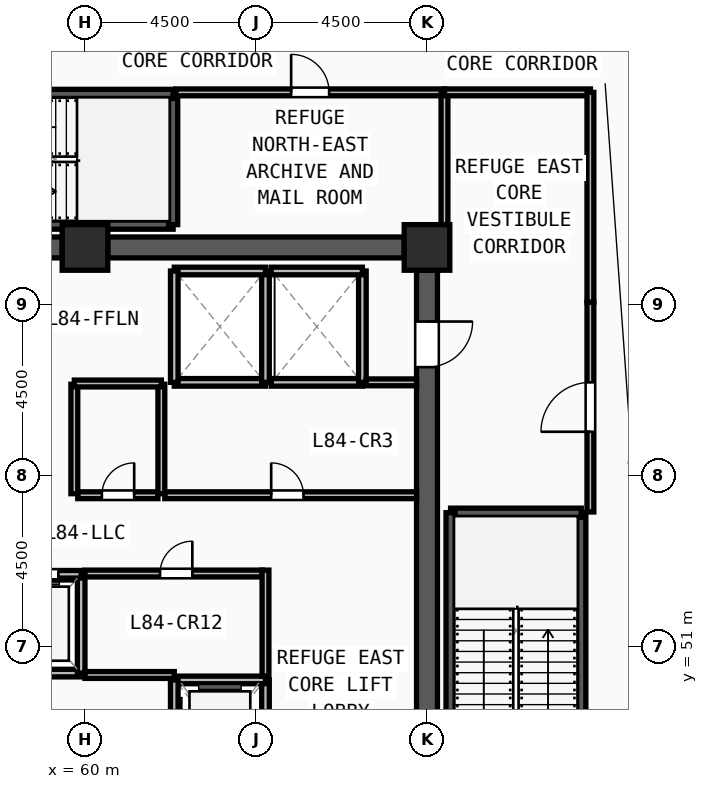
"""IFC4 building model, lengths in metres.
Left out: names, types, materials, properties, quantities, classifications, styles, units other than length and angle.
Written with IfcOpenShell. Run it as: python <this file> out.ifc"""

import sys

from ifc_helpers import new_model, si_unit, direction, frame, frame_2d, origin, origin_2d, place, context, subcontext, project, spatial, rectangle, extrude, source, transform, mapped, element, fill, save


model = new_model("IFC4")
c1 = context("Model", 3, precision=1e-05, world=origin(), true_north=direction((0.0, 1.0)))
c2 = subcontext(c1, "Body", "Model", "MODEL_VIEW")
j1 = project(units=[si_unit("LENGTHUNIT", "METRE"), si_unit("PLANEANGLEUNIT", "RADIAN")], contexts=[c1])
p1 = place(None, origin())
s1 = spatial("IfcSite", under=j1, at=p1, CompositionType="ELEMENT")
p2 = place(p1, origin())
s2 = spatial("IfcBuilding", under=s1, at=p2, CompositionType="ELEMENT")
p3 = place(p2, frame((0.0, 0.0, 324.0)))
s3 = spatial("IfcBuildingStorey", under=s2, at=p3, CompositionType="ELEMENT", Elevation=324.0)
m1 = source(origin(), c2, "Body", "SweptSolid", [
    extrude(rectangle(XDim=1.2, YDim=1.2, at=origin_2d()), origin(), (0.0, 0.0, 1.0), 4.5),
])
for number, where, z_axis, x_axis in (
    (1, (69.0, 61.5, 0.0), (0.0, 0.0, 1.0), (1.0, 0.0, 0.0)),
    (2, (60.0, 61.5, 0.0), (0.0, 0.0, 1.0), (1.0, 0.0, 0.0)),
):
    element("IfcColumn", number, at=place(p3, frame(where, z_axis=z_axis, x_axis=x_axis)), inside=s3, PredefinedType="COLUMN", context=c2, shape_type="MappedRepresentation", body=[
        mapped(m1, transform((0.0, 0.0, 0.0), x_axis=(1.0, 0.0, 0.0), y_axis=(0.0, 1.0, 0.0), z_axis=(0.0, 0.0, 1.0), scale=1.0)),
    ])
for number, where, z_axis, x_axis in (
    (3, (51.6, 61.5, 0.0), (0.0, 0.0, 1.0), (1.0, 0.0, 0.0)),
    (4, (60.6, 61.5, 0.0), (0.0, 0.0, 1.0), (1.0, 0.0, 0.0)),
):
    element("IfcWall", number, at=place(p3, frame(where, z_axis=z_axis, x_axis=x_axis)), inside=s3, PredefinedType="SHEAR", context=c2, shape_type="SweptSolid", body=[
        extrude(rectangle(XDim=7.8, YDim=0.55, at=frame_2d((3.9, 0.0))), origin(), (0.0, 0.0, 1.0), 4.32),
    ])
p4 = place(p3, frame((69.0, 60.9, 0.0), z_axis=(0.0, 0.0, 1.0), x_axis=(0.0, -1.0, 0.0)))
e5 = element("IfcWall", 5, at=p4, inside=s3, PredefinedType="SHEAR", context=c2, shape_type="SweptSolid", body=[
    extrude(rectangle(XDim=13.8, YDim=0.55, at=frame_2d((6.9, 0.0))), origin(), (0.0, 0.0, 1.0), 4.32),
])
m2 = source(origin(), c2, "Body", "SweptSolid", [
    extrude(rectangle(XDim=1.2, YDim=2.2, at=frame_2d((0.6, 1.1))), frame((0.0, 0.285, 0.0), z_axis=(0.0, -1.0, 0.0), x_axis=(1.0, 0.0, 0.0)), (0.0, 0.0, 1.0), 0.57),
])
p5 = place(p4, frame((1.35, 0.0, 0.0)))
e6 = element("IfcOpeningElement", 6, at=p5, cuts=e5, PredefinedType="OPENING", context=c2, shape_type="MappedRepresentation", body=[
    mapped(m2, transform((0.0, 0.0, 0.0), x_axis=(1.0, 0.0, 0.0), y_axis=(0.0, 1.0, 0.0), z_axis=(0.0, 0.0, 1.0), scale=1.0)),
])
p6 = place(p3, frame((73.06, 46.7, 0.0), z_axis=(0.0, 0.0, 1.0), x_axis=(0.0, 1.0, 0.0)))
e7 = element("IfcWall", 7, at=p6, inside=s3, PredefinedType="SOLIDWALL", context=c2, shape_type="SweptSolid", body=[
    extrude(rectangle(XDim=7.82, YDim=0.24, at=frame_2d((3.91, 0.0))), origin(), (0.0, 0.0, 1.0), 4.32),
])
m3 = source(origin(), c2, "Body", "SweptSolid", [
    extrude(rectangle(XDim=1.2, YDim=2.2, at=frame_2d((0.6, 1.1))), frame((0.0, 0.13, 0.0), z_axis=(0.0, -1.0, 0.0), x_axis=(1.0, 0.0, 0.0)), (0.0, 0.0, 1.0), 0.26),
])
p7 = place(p6, frame((0.32, 0.0, 0.0)))
e8 = element("IfcOpeningElement", 8, at=p7, cuts=e7, PredefinedType="OPENING", context=c2, shape_type="MappedRepresentation", body=[
    mapped(m3, transform((0.0, 0.0, 0.0), x_axis=(1.0, 0.0, 0.0), y_axis=(0.0, 1.0, 0.0), z_axis=(0.0, 0.0, 1.0), scale=1.0)),
])
p8 = place(p3, frame((73.06, 54.52, 0.0), z_axis=(0.0, 0.0, 1.0), x_axis=(-1.0, 0.0, 0.0)))
e9 = element("IfcWall", 9, at=p8, inside=s3, PredefinedType="SOLIDWALL", context=c2, shape_type="SweptSolid", body=[
    extrude(rectangle(XDim=3.44, YDim=0.24, at=frame_2d((1.72, 0.0))), origin(), (0.0, 0.0, 1.0), 4.32),
])
for number, where, z_axis, x_axis in (
    (10, (69.62, 54.52, 0.0), (0.0, 0.0, 1.0), (0.0, -1.0, 0.0)),
    (11, (54.5, 62.1, 0.0), (0.0, 0.0, 1.0), (1.0, 0.0, 0.0)),
):
    element("IfcWall", number, at=place(p3, frame(where, z_axis=z_axis, x_axis=x_axis)), inside=s3, PredefinedType="SOLIDWALL", context=c2, shape_type="SweptSolid", body=[
        extrude(rectangle(XDim=7.82, YDim=0.24, at=frame_2d((3.91, 0.0))), origin(), (0.0, 0.0, 1.0), 4.32),
    ])
p9 = place(p3, frame((62.32, 62.1, 0.0), z_axis=(0.0, 0.0, 1.0), x_axis=(0.0, 1.0, 0.0)))
e12 = element("IfcWall", 12, at=p9, inside=s3, PredefinedType="SOLIDWALL", context=c2, shape_type="SweptSolid", body=[
    extrude(rectangle(XDim=3.44, YDim=0.24, at=frame_2d((1.72, 0.0))), origin(), (0.0, 0.0, 1.0), 4.32),
])
p10 = place(p3, frame((62.32, 65.54, 0.0), z_axis=(0.0, 0.0, 1.0), x_axis=(-1.0, 0.0, 0.0)))
e13 = element("IfcWall", 13, at=p10, inside=s3, PredefinedType="SOLIDWALL", context=c2, shape_type="SweptSolid", body=[
    extrude(rectangle(XDim=7.82, YDim=0.24, at=frame_2d((3.91, 0.0))), origin(), (0.0, 0.0, 1.0), 4.32),
])
p11 = place(p10, frame((6.3, 0.0, 0.0)))
e14 = element("IfcOpeningElement", 14, at=p11, cuts=e13, PredefinedType="OPENING", context=c2, shape_type="MappedRepresentation", body=[
    mapped(m3, transform((0.0, 0.0, 0.0), x_axis=(1.0, 0.0, 0.0), y_axis=(0.0, 1.0, 0.0), z_axis=(0.0, 0.0, 1.0), scale=1.0)),
])
p12 = place(p3, frame((64.75, 47.12, 0.0), z_axis=(0.0, 0.0, 1.0), x_axis=(0.0, 1.0, 0.0)))
e15 = element("IfcWall", 15, at=p12, inside=s3, PredefinedType="SOLIDWALL", context=c2, shape_type="SweptSolid", body=[
    extrude(rectangle(XDim=3.0, YDim=0.2, at=frame_2d((1.5, 0.0))), origin(), (0.0, 0.0, 1.0), 4.32),
])
p13 = place(p3, frame((64.75, 50.12, 0.0), z_axis=(0.0, 0.0, 1.0), x_axis=(-1.0, 0.0, 0.0)))
e16 = element("IfcWall", 16, at=p13, inside=s3, PredefinedType="SOLIDWALL", context=c2, shape_type="SweptSolid", body=[
    extrude(rectangle(XDim=2.4, YDim=0.2, at=frame_2d((1.2, 0.0))), origin(), (0.0, 0.0, 1.0), 4.32),
])
p14 = place(p3, frame((62.35, 50.12, 0.0), z_axis=(0.0, 0.0, 1.0), x_axis=(0.0, -1.0, 0.0)))
e17 = element("IfcWall", 17, at=p14, inside=s3, PredefinedType="SOLIDWALL", context=c2, shape_type="SweptSolid", body=[
    extrude(rectangle(XDim=3.0, YDim=0.2, at=frame_2d((1.5, 0.0))), origin(), (0.0, 0.0, 1.0), 4.32),
])
m4 = source(origin(), c2, "Body", "SweptSolid", [
    extrude(rectangle(XDim=1.2, YDim=2.3, at=frame_2d((0.6, 1.15))), frame((0.0, 0.11, 0.0), z_axis=(0.0, -1.0, 0.0), x_axis=(1.0, 0.0, 0.0)), (0.0, 0.0, 1.0), 0.22),
])
p15 = place(p14, frame((0.9, 0.0, 0.0)))
e18 = element("IfcOpeningElement", 18, at=p15, cuts=e17, PredefinedType="OPENING", context=c2, shape_type="MappedRepresentation", body=[
    mapped(m4, transform((0.0, 0.0, 0.0), x_axis=(1.0, 0.0, 0.0), y_axis=(0.0, 1.0, 0.0), z_axis=(0.0, 0.0, 1.0), scale=1.0)),
])
p16 = place(p3, frame((62.35, 57.95, 0.0), z_axis=(0.0, 0.0, 1.0), x_axis=(1.0, 0.0, 0.0)))
e19 = element("IfcWall", 19, at=p16, inside=s3, PredefinedType="SOLIDWALL", context=c2, shape_type="SweptSolid", body=[
    extrude(rectangle(XDim=2.4, YDim=0.2, at=frame_2d((1.2, 0.0))), origin(), (0.0, 0.0, 1.0), 4.32),
])
p17 = place(p3, frame((64.75, 57.95, 0.0), z_axis=(0.0, 0.0, 1.0), x_axis=(0.0, 1.0, 0.0)))
e20 = element("IfcWall", 20, at=p17, inside=s3, PredefinedType="SOLIDWALL", context=c2, shape_type="SweptSolid", body=[
    extrude(rectangle(XDim=2.93, YDim=0.2, at=frame_2d((1.465, 0.0))), origin(), (0.0, 0.0, 1.0), 4.32),
])
p18 = place(p3, frame((64.75, 60.88, 0.0), z_axis=(0.0, 0.0, 1.0), x_axis=(-1.0, 0.0, 0.0)))
e21 = element("IfcWall", 21, at=p18, inside=s3, PredefinedType="SOLIDWALL", context=c2, shape_type="SweptSolid", body=[
    extrude(rectangle(XDim=2.4, YDim=0.2, at=frame_2d((1.2, 0.0))), origin(), (0.0, 0.0, 1.0), 4.32),
])
p19 = place(p3, frame((62.35, 60.88, 0.0), z_axis=(0.0, 0.0, 1.0), x_axis=(0.0, -1.0, 0.0)))
e22 = element("IfcWall", 22, at=p19, inside=s3, PredefinedType="SOLIDWALL", context=c2, shape_type="SweptSolid", body=[
    extrude(rectangle(XDim=2.93, YDim=0.2, at=frame_2d((1.465, 0.0))), origin(), (0.0, 0.0, 1.0), 4.32),
])
p20 = place(p3, frame((64.9, 57.95, 0.0), z_axis=(0.0, 0.0, 1.0), x_axis=(1.0, 0.0, 0.0)))
e23 = element("IfcWall", 23, at=p20, inside=s3, PredefinedType="SOLIDWALL", context=c2, shape_type="SweptSolid", body=[
    extrude(rectangle(XDim=2.4, YDim=0.2, at=frame_2d((1.2, 0.0))), origin(), (0.0, 0.0, 1.0), 4.32),
])
p21 = place(p3, frame((67.3, 57.95, 0.0), z_axis=(0.0, 0.0, 1.0), x_axis=(0.0, 1.0, 0.0)))
e24 = element("IfcWall", 24, at=p21, inside=s3, PredefinedType="SOLIDWALL", context=c2, shape_type="SweptSolid", body=[
    extrude(rectangle(XDim=2.93, YDim=0.2, at=frame_2d((1.465, 0.0))), origin(), (0.0, 0.0, 1.0), 4.32),
])
p22 = place(p3, frame((67.3, 60.88, 0.0), z_axis=(0.0, 0.0, 1.0), x_axis=(-1.0, 0.0, 0.0)))
e25 = element("IfcWall", 25, at=p22, inside=s3, PredefinedType="SOLIDWALL", context=c2, shape_type="SweptSolid", body=[
    extrude(rectangle(XDim=2.4, YDim=0.2, at=frame_2d((1.2, 0.0))), origin(), (0.0, 0.0, 1.0), 4.32),
])
p23 = place(p3, frame((57.6, 50.3, 0.0), z_axis=(0.0, 0.0, 1.0), x_axis=(1.0, 0.0, 0.0)))
e26 = element("IfcWall", 26, at=p23, inside=s3, PredefinedType="SOLIDWALL", context=c2, shape_type="SweptSolid", body=[
    extrude(rectangle(XDim=2.3, YDim=0.2, at=frame_2d((1.15, 0.0))), origin(), (0.0, 0.0, 1.0), 4.32),
])
p24 = place(p3, frame((59.9, 50.3, 0.0), z_axis=(0.0, 0.0, 1.0), x_axis=(0.0, 1.0, 0.0)))
e27 = element("IfcWall", 27, at=p24, inside=s3, PredefinedType="SOLIDWALL", context=c2, shape_type="SweptSolid", body=[
    extrude(rectangle(XDim=2.6, YDim=0.2, at=frame_2d((1.3, 0.0))), origin(), (0.0, 0.0, 1.0), 4.32),
])
p25 = place(p3, frame((59.9, 52.9, 0.0), z_axis=(0.0, 0.0, 1.0), x_axis=(-1.0, 0.0, 0.0)))
e28 = element("IfcWall", 28, at=p25, inside=s3, PredefinedType="SOLIDWALL", context=c2, shape_type="SweptSolid", body=[
    extrude(rectangle(XDim=2.3, YDim=0.2, at=frame_2d((1.15, 0.0))), origin(), (0.0, 0.0, 1.0), 4.32),
])
m5 = source(origin(), c2, "Body", "SweptSolid", [
    extrude(rectangle(XDim=1.1, YDim=2.2, at=frame_2d((0.55, 1.1))), frame((0.0, 0.11, 0.0), z_axis=(0.0, -1.0, 0.0), x_axis=(1.0, 0.0, 0.0)), (0.0, 0.0, 1.0), 0.22),
])
p26 = place(p25, frame((0.6, 0.0, 0.0)))
e29 = element("IfcOpeningElement", 29, at=p26, cuts=e28, PredefinedType="OPENING", context=c2, shape_type="MappedRepresentation", body=[
    mapped(m5, transform((0.0, 0.0, 0.0), x_axis=(1.0, 0.0, 0.0), y_axis=(0.0, 1.0, 0.0), z_axis=(0.0, 0.0, 1.0), scale=1.0)),
])
p27 = place(p3, frame((60.0, 52.92, 0.0), z_axis=(0.0, 0.0, 1.0), x_axis=(1.0, 0.0, 0.0)))
e30 = element("IfcWall", 30, at=p27, inside=s3, PredefinedType="PARTITIONING", context=c2, shape_type="SweptSolid", body=[
    extrude(rectangle(XDim=4.66, YDim=0.18, at=frame_2d((2.33, 0.0))), origin(), (0.0, 0.0, 1.0), 4.32),
])
m6 = source(origin(), c2, "Body", "SweptSolid", [
    extrude(rectangle(XDim=0.85, YDim=2.1, at=frame_2d((0.425, 1.05))), frame((0.0, 0.1, 0.0), z_axis=(0.0, -1.0, 0.0), x_axis=(1.0, 0.0, 0.0)), (0.0, 0.0, 1.0), 0.2),
])
p28 = place(p27, frame((1.975, 0.0, 0.0)))
e31 = element("IfcOpeningElement", 31, at=p28, cuts=e30, PredefinedType="OPENING", context=c2, shape_type="MappedRepresentation", body=[
    mapped(m6, transform((0.0, 0.0, 0.0), x_axis=(1.0, 0.0, 0.0), y_axis=(0.0, 1.0, 0.0), z_axis=(0.0, 0.0, 1.0), scale=1.0)),
])
p29 = place(p3, frame((62.1, 54.98, 0.0), z_axis=(0.0, 0.0, 1.0), x_axis=(1.0, 0.0, 0.0)))
e32 = element("IfcWall", 32, at=p29, inside=s3, PredefinedType="PARTITIONING", context=c2, shape_type="SweptSolid", body=[
    extrude(rectangle(XDim=6.625, YDim=0.18, at=frame_2d((3.312, 0.0))), origin(), (0.0, 0.0, 1.0), 4.32),
])
p30 = place(p29, frame((2.8, 0.0, 0.0)))
e33 = element("IfcOpeningElement", 33, at=p30, cuts=e32, PredefinedType="OPENING", context=c2, shape_type="MappedRepresentation", body=[
    mapped(m6, transform((0.0, 0.0, 0.0), x_axis=(1.0, 0.0, 0.0), y_axis=(0.0, 1.0, 0.0), z_axis=(0.0, 0.0, 1.0), scale=1.0)),
])
p31 = place(p3, frame((59.81, 54.98, 0.0), z_axis=(0.0, 0.0, 1.0), x_axis=(1.0, 0.0, 0.0)))
e34 = element("IfcWall", 34, at=p31, inside=s3, PredefinedType="PARTITIONING", context=c2, shape_type="SweptSolid", body=[
    extrude(rectangle(XDim=2.11, YDim=0.18, at=frame_2d((1.055, 0.0))), origin(), (0.0, 0.0, 1.0), 4.32),
])
p32 = place(p31, frame((0.635, 0.0, 0.0)))
e35 = element("IfcOpeningElement", 35, at=p32, cuts=e34, PredefinedType="OPENING", context=c2, shape_type="MappedRepresentation", body=[
    mapped(m6, transform((0.0, 0.0, 0.0), x_axis=(1.0, 0.0, 0.0), y_axis=(0.0, 1.0, 0.0), z_axis=(0.0, 0.0, 1.0), scale=1.0)),
])
p33 = place(p3, frame((62.39, 65.58, 0.0), z_axis=(0.0, 0.0, 1.0), x_axis=(1.0, 0.0, 0.0)))
e36 = element("IfcWall", 36, at=p33, inside=s3, PredefinedType="PARTITIONING", context=c2, shape_type="SweptSolid", body=[
    extrude(rectangle(XDim=7.07, YDim=0.18, at=frame_2d((3.535, 0.0))), origin(), (0.0, 0.0, 1.0), 4.32),
])
m7 = source(origin(), c2, "Body", "SweptSolid", [
    extrude(rectangle(XDim=1.0, YDim=2.2, at=frame_2d((0.5, 1.1))), frame((0.0, 0.1, 0.0), z_axis=(0.0, -1.0, 0.0), x_axis=(1.0, 0.0, 0.0)), (0.0, 0.0, 1.0), 0.2),
])
p34 = place(p33, frame((3.035, 0.0, 0.0)))
e37 = element("IfcOpeningElement", 37, at=p34, cuts=e36, PredefinedType="OPENING", context=c2, shape_type="MappedRepresentation", body=[
    mapped(m7, transform((0.0, 0.0, 0.0), x_axis=(1.0, 0.0, 0.0), y_axis=(0.0, 1.0, 0.0), z_axis=(0.0, 0.0, 1.0), scale=1.0)),
])
p35 = place(p3, frame((73.3, 54.54, 0.0), z_axis=(0.0, 0.0, 1.0), x_axis=(0.0, 1.0, 0.0)))
e38 = element("IfcWall", 38, at=p35, inside=s3, PredefinedType="PARTITIONING", context=c2, shape_type="SweptSolid", body=[
    extrude(rectangle(XDim=5.52, YDim=0.18, at=frame_2d((2.76, 0.0))), origin(), (0.0, 0.0, 1.0), 4.32),
])
m8 = source(origin(), c2, "Body", "SweptSolid", [
    extrude(rectangle(XDim=1.3, YDim=2.2, at=frame_2d((0.65, 1.1))), frame((0.0, 0.1, 0.0), z_axis=(0.0, -1.0, 0.0), x_axis=(1.0, 0.0, 0.0)), (0.0, 0.0, 1.0), 0.2),
])
p36 = place(p35, frame((2.11, 0.0, 0.0)))
e39 = element("IfcOpeningElement", 39, at=p36, cuts=e38, PredefinedType="OPENING", context=c2, shape_type="MappedRepresentation", body=[
    mapped(m8, transform((0.0, 0.0, 0.0), x_axis=(1.0, 0.0, 0.0), y_axis=(0.0, 1.0, 0.0), z_axis=(0.0, 0.0, 1.0), scale=1.0)),
])
for number, where, z_axis, x_axis in (
    (40, (59.72, 55.02, 0.0), (0.0, 0.0, 1.0), (0.0, 1.0, 0.0)),
    (41, (62.01, 55.02, 0.0), (0.0, 0.0, 1.0), (0.0, 1.0, 0.0)),
):
    element("IfcWall", number, at=place(p3, frame(where, z_axis=z_axis, x_axis=x_axis)), inside=s3, PredefinedType="PARTITIONING", context=c2, shape_type="SweptSolid", body=[
        extrude(rectangle(XDim=2.88, YDim=0.18, at=frame_2d((1.44, 0.0))), origin(), (0.0, 0.0, 1.0), 4.32),
    ])
p37 = place(p3, frame((59.72, 57.92, 0.0), z_axis=(0.0, 0.0, 1.0), x_axis=(1.0, 0.0, 0.0)))
e42 = element("IfcWall", 42, at=p37, inside=s3, PredefinedType="PARTITIONING", context=c2, shape_type="SweptSolid", body=[
    extrude(rectangle(XDim=2.29, YDim=0.18, at=frame_2d((1.145, 0.0))), origin(), (0.0, 0.0, 1.0), 4.32),
])
p38 = place(p3, frame((69.46, 61.95, 0.0), z_axis=(0.0, 0.0, 1.0), x_axis=(0.0, 1.0, 0.0)))
e43 = element("IfcWall", 43, at=p38, inside=s3, PredefinedType="PARTITIONING", context=c2, shape_type="SweptSolid", body=[
    extrude(rectangle(XDim=3.63, YDim=0.18, at=frame_2d((1.815, 0.0))), origin(), (0.0, 0.0, 1.0), 4.32),
])
p39 = place(p3, frame((69.46, 65.58, 0.0), z_axis=(0.0, 0.0, 1.0), x_axis=(1.0, 0.0, 0.0)))
e44 = element("IfcWall", 44, at=p39, inside=s3, PredefinedType="PARTITIONING", context=c2, shape_type="SweptSolid", body=[
    extrude(rectangle(XDim=3.84, YDim=0.18, at=frame_2d((1.92, 0.0))), origin(), (0.0, 0.0, 1.0), 4.32),
])
p40 = place(p3, frame((73.3, 60.06, 0.0), z_axis=(0.0, 0.0, 1.0), x_axis=(0.0, 1.0, 0.0)))
e45 = element("IfcWall", 45, at=p40, inside=s3, PredefinedType="PARTITIONING", context=c2, shape_type="SweptSolid", body=[
    extrude(rectangle(XDim=5.52, YDim=0.18, at=frame_2d((2.76, 0.0))), origin(), (0.0, 0.0, 1.0), 4.32),
])
p41 = place(p3, frame((64.75, 50.22, 0.0), z_axis=(0.0, 0.0, 1.0), x_axis=(0.0, 1.0, 0.0)))
e46 = element("IfcWall", 46, at=p41, inside=s3, PredefinedType="PARTITIONING", context=c2, shape_type="SweptSolid", body=[
    extrude(rectangle(XDim=2.79, YDim=0.18, at=frame_2d((1.395, 0.0))), origin(), (0.0, 0.0, 1.0), 4.32),
])
p42 = place(p3, frame((60.0, 50.25, 0.0), z_axis=(0.0, 0.0, 1.0), x_axis=(1.0, 0.0, 0.0)))
e47 = element("IfcWall", 47, at=p42, inside=s3, PredefinedType="PARTITIONING", context=c2, shape_type="SweptSolid", body=[
    extrude(rectangle(XDim=2.35, YDim=0.18, at=frame_2d((1.175, 0.0))), origin(), (0.0, 0.0, 1.0), 4.32),
])
p43 = place(p3, frame((67.4, 57.95, 0.0), z_axis=(0.0, 0.0, 1.0), x_axis=(1.0, 0.0, 0.0)))
e48 = element("IfcWall", 48, at=p43, inside=s3, PredefinedType="PARTITIONING", context=c2, shape_type="SweptSolid", body=[
    extrude(rectangle(XDim=1.325, YDim=0.18, at=frame_2d((0.663, 0.0))), origin(), (0.0, 0.0, 1.0), 4.32),
])
m9 = source(origin(), c2, "Body", "SweptSolid", [
    extrude(rectangle(XDim=1.2, YDim=2.2, at=frame_2d((0.6, 1.1))), frame((0.0, 0.025, 0.0), z_axis=(0.0, -1.0, 0.0), x_axis=(1.0, 0.0, 0.0)), (0.0, 0.0, 1.0), 0.05),
])
p44 = place(p5, origin())
e49 = element("IfcDoor", 49, at=p44, inside=s3, OperationType="SINGLE_SWING_LEFT", PredefinedType="DOOR", context=c2, shape_type="MappedRepresentation", body=[
    mapped(m9, transform((0.0, 0.0, 0.0), x_axis=(1.0, 0.0, 0.0), y_axis=(0.0, 1.0, 0.0), z_axis=(0.0, 0.0, 1.0), scale=1.0)),
])
fill(e6, e49)
m10 = source(origin(), c2, "Body", "SweptSolid", [
    extrude(rectangle(XDim=1.1, YDim=2.2, at=frame_2d((0.55, 1.1))), frame((0.0, 0.025, 0.0), z_axis=(0.0, -1.0, 0.0), x_axis=(1.0, 0.0, 0.0)), (0.0, 0.0, 1.0), 0.05),
])
p45 = place(p26, origin())
e50 = element("IfcDoor", 50, at=p45, inside=s3, OperationType="SLIDING_TO_LEFT", PredefinedType="DOOR", context=c2, shape_type="MappedRepresentation", body=[
    mapped(m10, transform((0.0, 0.0, 0.0), x_axis=(1.0, 0.0, 0.0), y_axis=(0.0, 1.0, 0.0), z_axis=(0.0, 0.0, 1.0), scale=1.0)),
])
fill(e29, e50)
m11 = source(origin(), c2, "Body", "SweptSolid", [
    extrude(rectangle(XDim=0.85, YDim=2.1, at=frame_2d((0.425, 1.05))), frame((0.0, 0.025, 0.0), z_axis=(0.0, -1.0, 0.0), x_axis=(1.0, 0.0, 0.0)), (0.0, 0.0, 1.0), 0.05),
])
p46 = place(p28, origin())
e51 = element("IfcDoor", 51, at=p46, inside=s3, OperationType="SINGLE_SWING_RIGHT", PredefinedType="DOOR", context=c2, shape_type="MappedRepresentation", body=[
    mapped(m11, transform((0.0, 0.0, 0.0), x_axis=(1.0, 0.0, 0.0), y_axis=(0.0, 1.0, 0.0), z_axis=(0.0, 0.0, 1.0), scale=1.0)),
])
fill(e31, e51)
p47 = place(p30, origin())
e52 = element("IfcDoor", 52, at=p47, inside=s3, OperationType="SINGLE_SWING_LEFT", PredefinedType="DOOR", context=c2, shape_type="MappedRepresentation", body=[
    mapped(m11, transform((0.0, 0.0, 0.0), x_axis=(1.0, 0.0, 0.0), y_axis=(0.0, 1.0, 0.0), z_axis=(0.0, 0.0, 1.0), scale=1.0)),
])
fill(e33, e52)
p48 = place(p32, origin())
e53 = element("IfcDoor", 53, at=p48, inside=s3, OperationType="SINGLE_SWING_RIGHT", PredefinedType="DOOR", context=c2, shape_type="MappedRepresentation", body=[
    mapped(m11, transform((0.0, 0.0, 0.0), x_axis=(1.0, 0.0, 0.0), y_axis=(0.0, 1.0, 0.0), z_axis=(0.0, 0.0, 1.0), scale=1.0)),
])
fill(e35, e53)
m12 = source(origin(), c2, "Body", "SweptSolid", [
    extrude(rectangle(XDim=1.0, YDim=2.2, at=frame_2d((0.5, 1.1))), frame((0.0, 0.025, 0.0), z_axis=(0.0, -1.0, 0.0), x_axis=(1.0, 0.0, 0.0)), (0.0, 0.0, 1.0), 0.05),
])
p49 = place(p34, origin())
e54 = element("IfcDoor", 54, at=p49, inside=s3, OperationType="SINGLE_SWING_LEFT", PredefinedType="DOOR", context=c2, shape_type="MappedRepresentation", body=[
    mapped(m12, transform((0.0, 0.0, 0.0), x_axis=(1.0, 0.0, 0.0), y_axis=(0.0, 1.0, 0.0), z_axis=(0.0, 0.0, 1.0), scale=1.0)),
])
fill(e37, e54)
m13 = source(origin(), c2, "Body", "SweptSolid", [
    extrude(rectangle(XDim=1.3, YDim=2.2, at=frame_2d((0.65, 1.1))), frame((0.0, 0.025, 0.0), z_axis=(0.0, -1.0, 0.0), x_axis=(1.0, 0.0, 0.0)), (0.0, 0.0, 1.0), 0.05),
])
p50 = place(p36, origin())
e55 = element("IfcDoor", 55, at=p50, inside=s3, OperationType="SINGLE_SWING_LEFT", PredefinedType="DOOR", context=c2, shape_type="MappedRepresentation", body=[
    mapped(m13, transform((0.0, 0.0, 0.0), x_axis=(1.0, 0.0, 0.0), y_axis=(0.0, 1.0, 0.0), z_axis=(0.0, 0.0, 1.0), scale=1.0)),
])
fill(e39, e55)
save(model, sys.argv[1])
